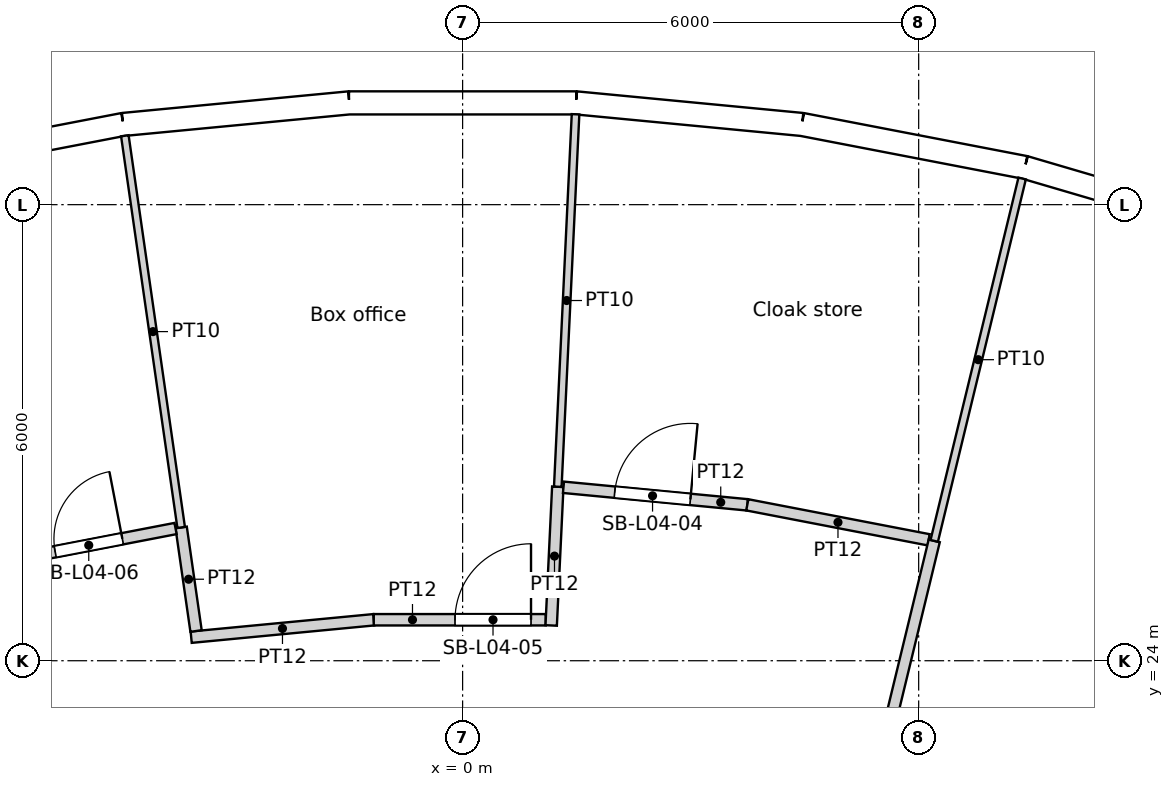
"""IFC4 building model, lengths in metres.
Left out: names, types, materials, properties, quantities, classifications, styles, units other than length and angle.
Written with IfcOpenShell. Run it as: python <this file> out.ifc"""

import sys

from ifc_helpers import new_model, si_unit, direction, frame, frame_2d, origin, origin_2d, place, context, subcontext, project, spatial, rectangle, circle, extrude, element, fill, save


model = new_model("IFC4")
c1 = context("Model", 3, precision=1e-05, world=origin(), true_north=direction((0.0, 1.0)))
c2 = subcontext(c1, "Body", "Model", "MODEL_VIEW")
j1 = project(units=[si_unit("LENGTHUNIT", "METRE"), si_unit("PLANEANGLEUNIT", "RADIAN")], contexts=[c1])
p1 = place(None, origin())
s1 = spatial("IfcSite", under=j1, at=p1, CompositionType="ELEMENT")
p2 = place(p1, origin())
s2 = spatial("IfcBuilding", under=s1, at=p2, CompositionType="ELEMENT")
p3 = place(p2, frame((0.0, 0.0, 23.4)))
s3 = spatial("IfcBuildingStorey", under=s2, at=p3, CompositionType="ELEMENT", Elevation=23.4)
for number, where, z_axis, x_axis in (
    (1, (7.137, 29.421, 0.0), (0.0, 0.0, 1.0), (1.0, 0.0, 0.0)),
    (2, (1.44, 30.24, 0.0), (0.0, 0.0, 1.0), (1.0, 0.0, 0.0)),
    (3, (-4.309, 29.966, 0.0), (0.0, 0.0, 1.0), (1.0, 0.0, 0.0)),
):
    element("IfcColumn", number, at=place(p3, frame(where, z_axis=z_axis, x_axis=x_axis)), inside=s3, PredefinedType="COLUMN", context=c2, shape_type="SweptSolid", body=[
        extrude(circle(Radius=0.7, at=origin_2d()), origin(), (0.0, 0.0, 1.0), 4.8),
    ])
for number, where, z_axis, x_axis in (
    (4, (4.263, 24.175, 0.0), (0.0, 0.0, 1.0), (1.0, 0.0, 0.0)),
    (5, (-1.427, 24.506, 0.0), (0.0, 0.0, 1.0), (1.0, 0.0, 0.0)),
):
    element("IfcColumn", number, at=place(p3, frame(where, z_axis=z_axis, x_axis=x_axis)), inside=s3, PredefinedType="COLUMN", context=c2, shape_type="SweptSolid", body=[
        extrude(circle(Radius=0.75, at=origin_2d()), origin(), (0.0, 0.0, 1.0), 4.8),
    ])
p4 = place(p3, frame((10.261, 29.649, 0.0), z_axis=(0.0, 0.0, 1.0), x_axis=(-0.959502108153, 0.281701445593, 0.0)))
e6 = element("IfcWall", 6, at=p4, inside=s3, PredefinedType="SOLIDWALL", context=c2, shape_type="SweptSolid", body=[
    extrude(rectangle(XDim=2.986, YDim=0.3, at=frame_2d((1.493, 0.0))), origin(), (0.0, 0.0, 1.0), 4.35),
])
p5 = place(p4, frame((1.493, 0.0, 2.0)))
e7 = element("IfcOpeningElement", 7, at=p5, cuts=e6, PredefinedType="OPENING", context=c2, shape_type="SweptSolid", body=[
    extrude(circle(Radius=1.2, at=origin_2d()), frame((0.0, 0.16, 0.0), z_axis=(0.0, -1.0, 0.0), x_axis=(1.0, 0.0, 0.0)), (0.0, 0.0, 1.0), 0.32),
])
p6 = place(p3, frame((7.397, 30.49, 0.0), z_axis=(0.0, 0.0, 1.0), x_axis=(-0.981918853666, 0.189302310646, 0.0)))
e8 = element("IfcWall", 8, at=p6, inside=s3, PredefinedType="SOLIDWALL", context=c2, shape_type="SweptSolid", body=[
    extrude(rectangle(XDim=2.986, YDim=0.3, at=frame_2d((1.493, 0.0))), origin(), (0.0, 0.0, 1.0), 4.35),
])
p7 = place(p6, frame((1.493, 0.0, 2.0)))
e9 = element("IfcOpeningElement", 9, at=p7, cuts=e8, PredefinedType="OPENING", context=c2, shape_type="SweptSolid", body=[
    extrude(circle(Radius=1.2, at=origin_2d()), frame((0.0, 0.16, 0.0), z_axis=(0.0, -1.0, 0.0), x_axis=(1.0, 0.0, 0.0)), (0.0, 0.0, 1.0), 0.32),
])
p8 = place(p3, frame((4.465, 31.055, 0.0), z_axis=(0.0, 0.0, 1.0), x_axis=(-0.99547560533, 0.095017467833, 0.0)))
e10 = element("IfcWall", 10, at=p8, inside=s3, PredefinedType="SOLIDWALL", context=c2, shape_type="SweptSolid", body=[
    extrude(rectangle(XDim=2.986, YDim=0.3, at=frame_2d((1.493, 0.0))), origin(), (0.0, 0.0, 1.0), 3.85),
])
p9 = place(p8, frame((1.493, 0.0, 2.0)))
e11 = element("IfcOpeningElement", 11, at=p9, cuts=e10, PredefinedType="OPENING", context=c2, shape_type="SweptSolid", body=[
    extrude(circle(Radius=1.2, at=origin_2d()), frame((0.0, 0.16, 0.0), z_axis=(0.0, -1.0, 0.0), x_axis=(1.0, 0.0, 0.0)), (0.0, 0.0, 1.0), 0.32),
])
p10 = place(p3, frame((1.493, 31.339, 0.0), z_axis=(0.0, 0.0, 1.0), x_axis=(-1.0, 0.0, 0.0)))
e12 = element("IfcWall", 12, at=p10, inside=s3, PredefinedType="SOLIDWALL", context=c2, shape_type="SweptSolid", body=[
    extrude(rectangle(XDim=2.986, YDim=0.3, at=frame_2d((1.493, 0.0))), origin(), (0.0, 0.0, 1.0), 4.35),
])
p11 = place(p10, frame((1.493, 0.0, 2.0)))
e13 = element("IfcOpeningElement", 13, at=p11, cuts=e12, PredefinedType="OPENING", context=c2, shape_type="SweptSolid", body=[
    extrude(circle(Radius=1.2, at=origin_2d()), frame((0.0, 0.16, 0.0), z_axis=(0.0, -1.0, 0.0), x_axis=(1.0, 0.0, 0.0)), (0.0, 0.0, 1.0), 0.32),
])
p12 = place(p3, frame((-1.493, 31.339, 0.0), z_axis=(0.0, 0.0, 1.0), x_axis=(-0.99547560533, -0.095017467833, 0.0)))
e14 = element("IfcWall", 14, at=p12, inside=s3, PredefinedType="SOLIDWALL", context=c2, shape_type="SweptSolid", body=[
    extrude(rectangle(XDim=2.986, YDim=0.3, at=frame_2d((1.493, 0.0))), origin(), (0.0, 0.0, 1.0), 4.35),
])
p13 = place(p12, frame((1.493, 0.0, 2.0)))
e15 = element("IfcOpeningElement", 15, at=p13, cuts=e14, PredefinedType="OPENING", context=c2, shape_type="SweptSolid", body=[
    extrude(circle(Radius=1.2, at=origin_2d()), frame((0.0, 0.16, 0.0), z_axis=(0.0, -1.0, 0.0), x_axis=(1.0, 0.0, 0.0)), (0.0, 0.0, 1.0), 0.32),
])
p14 = place(p3, frame((-4.465, 31.055, 0.0), z_axis=(0.0, 0.0, 1.0), x_axis=(-0.981918853666, -0.189302310646, 0.0)))
e16 = element("IfcWall", 16, at=p14, inside=s3, PredefinedType="SOLIDWALL", context=c2, shape_type="SweptSolid", body=[
    extrude(rectangle(XDim=2.986, YDim=0.3, at=frame_2d((1.493, 0.0))), origin(), (0.0, 0.0, 1.0), 3.85),
])
p15 = place(p14, frame((1.493, 0.0, 2.0)))
e17 = element("IfcOpeningElement", 17, at=p15, cuts=e16, PredefinedType="OPENING", context=c2, shape_type="SweptSolid", body=[
    extrude(circle(Radius=1.2, at=origin_2d()), frame((0.0, 0.16, 0.0), z_axis=(0.0, -1.0, 0.0), x_axis=(1.0, 0.0, 0.0)), (0.0, 0.0, 1.0), 0.32),
])
p16 = place(p3, frame((-4.444, 30.906, 0.0), z_axis=(0.0, 0.0, 1.0), x_axis=(0.142281368884, -0.989826253475, 0.0)))
e18 = element("IfcWall", 18, at=p16, inside=s3, PredefinedType="PARTITIONING", context=c2, shape_type="SweptSolid", body=[
    extrude(rectangle(XDim=5.206, YDim=0.1, at=frame_2d((2.603, 0.0))), origin(), (0.0, 0.0, 1.0), 3.75),
])
p17 = place(p3, frame((-6.134, 25.285, 0.0), z_axis=(0.0, 0.0, 1.0), x_axis=(0.981929480724, 0.189247179332, 0.0)))
e19 = element("IfcWall", 19, at=p17, inside=s3, PredefinedType="PARTITIONING", context=c2, shape_type="SweptSolid", body=[
    extrude(rectangle(XDim=2.401, YDim=0.15, at=frame_2d((1.2, 0.0))), origin(), (0.0, 0.0, 1.0), 3.75),
])
p18 = place(p17, frame((0.788, 0.0, 0.0)))
e20 = element("IfcOpeningElement", 20, at=p18, cuts=e19, PredefinedType="OPENING", context=c2, shape_type="SweptSolid", body=[
    extrude(rectangle(XDim=0.9, YDim=2.1, at=frame_2d((0.45, 1.05))), frame((0.0, 0.075, 0.0), z_axis=(0.0, -1.0, 0.0), x_axis=(1.0, 0.0, 0.0)), (0.0, 0.0, 1.0), 0.15),
])
p19 = place(p3, frame((-3.703, 25.753, 0.0), z_axis=(0.0, 0.0, 1.0), x_axis=(0.142414461885, -0.989807113051, 0.0)))
e21 = element("IfcWall", 21, at=p19, inside=s3, PredefinedType="PARTITIONING", context=c2, shape_type="SweptSolid", body=[
    extrude(rectangle(XDim=1.376, YDim=0.15, at=frame_2d((0.688, 0.0))), origin(), (0.0, 0.0, 1.0), 3.75),
])
p20 = place(p3, frame((-1.169, 24.539, 0.0), z_axis=(0.0, 0.0, 1.0), x_axis=(-0.995475896214, -0.095014420263, 0.0)))
e22 = element("IfcWall", 22, at=p20, inside=s3, PredefinedType="PARTITIONING", context=c2, shape_type="SweptSolid", body=[
    extrude(rectangle(XDim=2.413, YDim=0.15, at=frame_2d((1.207, 0.0))), origin(), (0.0, 0.0, 1.0), 3.75),
])
p21 = place(p3, frame((-1.169, 24.539, 0.0), z_axis=(0.0, 0.0, 1.0), x_axis=(1.0, 0.0, 0.0)))
e23 = element("IfcWall", 23, at=p21, inside=s3, PredefinedType="PARTITIONING", context=c2, shape_type="SweptSolid", body=[
    extrude(rectangle(XDim=2.263, YDim=0.15, at=frame_2d((1.131, 0.0))), origin(), (0.0, 0.0, 1.0), 3.75),
])
p22 = place(p21, frame((1.069, 0.0, 0.0)))
e24 = element("IfcOpeningElement", 24, at=p22, cuts=e23, PredefinedType="OPENING", context=c2, shape_type="SweptSolid", body=[
    extrude(rectangle(XDim=1.0, YDim=2.1, at=frame_2d((0.5, 1.05))), frame((0.0, 0.075, 0.0), z_axis=(0.0, -1.0, 0.0), x_axis=(1.0, 0.0, 0.0)), (0.0, 0.0, 1.0), 0.15),
])
p23 = place(p3, frame((1.252, 26.289, 0.0), z_axis=(0.0, 0.0, 1.0), x_axis=(-0.047577848771, -0.998867532912, 0.0)))
e25 = element("IfcWall", 25, at=p23, inside=s3, PredefinedType="PARTITIONING", context=c2, shape_type="SweptSolid", body=[
    extrude(rectangle(XDim=1.827, YDim=0.15, at=frame_2d((0.913, 0.0))), origin(), (0.0, 0.0, 1.0), 3.75),
])
p24 = place(p3, frame((1.486, 31.189, 0.0), z_axis=(0.0, 0.0, 1.0), x_axis=(-0.04757697182, -0.998867574683, 0.0)))
e26 = element("IfcWall", 26, at=p24, inside=s3, PredefinedType="PARTITIONING", context=c2, shape_type="SweptSolid", body=[
    extrude(rectangle(XDim=4.906, YDim=0.1, at=frame_2d((2.453, 0.0))), origin(), (0.0, 0.0, 1.0), 3.75),
])
p25 = place(p3, frame((1.327, 26.282, 0.0), z_axis=(0.0, 0.0, 1.0), x_axis=(0.995471958699, -0.095055664977, 0.0)))
e27 = element("IfcWall", 27, at=p25, inside=s3, PredefinedType="PARTITIONING", context=c2, shape_type="SweptSolid", body=[
    extrude(rectangle(XDim=2.43, YDim=0.15, at=frame_2d((1.215, 0.0))), origin(), (0.0, 0.0, 1.0), 3.75),
])
p26 = place(p25, frame((0.677, 0.0, 0.0)))
e28 = element("IfcOpeningElement", 28, at=p26, cuts=e27, PredefinedType="OPENING", context=c2, shape_type="SweptSolid", body=[
    extrude(rectangle(XDim=1.0, YDim=2.1, at=frame_2d((0.5, 1.05))), frame((0.0, 0.075, 0.0), z_axis=(0.0, -1.0, 0.0), x_axis=(1.0, 0.0, 0.0)), (0.0, 0.0, 1.0), 0.15),
])
p27 = place(p3, frame((6.205, 25.577, 0.0), z_axis=(0.0, 0.0, 1.0), x_axis=(-0.235759138487, -0.971811519082, 0.0)))
e29 = element("IfcWall", 29, at=p27, inside=s3, PredefinedType="PARTITIONING", context=c2, shape_type="SweptSolid", body=[
    extrude(rectangle(XDim=13.482, YDim=0.15, at=frame_2d((6.741, 0.0))), origin(), (0.0, 0.0, 1.0), 3.75),
])
p28 = place(p3, frame((6.131, 25.591, 0.0), z_axis=(0.0, 0.0, 1.0), x_axis=(-0.981932542108, 0.189231294319, 0.0)))
e30 = element("IfcWall", 30, at=p28, inside=s3, PredefinedType="PARTITIONING", context=c2, shape_type="SweptSolid", body=[
    extrude(rectangle(XDim=2.429, YDim=0.15, at=frame_2d((1.215, 0.0))), origin(), (0.0, 0.0, 1.0), 3.75),
])
p29 = place(p3, frame((7.361, 30.344, 0.0), z_axis=(0.0, 0.0, 1.0), x_axis=(-0.235760987456, -0.971811070524, 0.0)))
e31 = element("IfcWall", 31, at=p29, inside=s3, PredefinedType="PARTITIONING", context=c2, shape_type="SweptSolid", body=[
    extrude(rectangle(XDim=4.905, YDim=0.1, at=frame_2d((2.453, 0.0))), origin(), (0.0, 0.0, 1.0), 3.75),
])
p30 = place(p5, origin())
e32 = element("IfcWindow", 32, at=p30, inside=s3, PartitioningType="SINGLE_PANEL", PredefinedType="WINDOW", context=c2, shape_type="SweptSolid", body=[
    extrude(circle(Radius=1.2, at=origin_2d()), frame((0.0, 0.12, 0.0), z_axis=(0.0, -1.0, 0.0), x_axis=(1.0, 0.0, 0.0)), (0.0, 0.0, 1.0), 0.1),
])
fill(e7, e32)
p31 = place(p7, origin())
e33 = element("IfcWindow", 33, at=p31, inside=s3, PartitioningType="SINGLE_PANEL", PredefinedType="WINDOW", context=c2, shape_type="SweptSolid", body=[
    extrude(circle(Radius=1.2, at=origin_2d()), frame((0.0, 0.12, 0.0), z_axis=(0.0, -1.0, 0.0), x_axis=(1.0, 0.0, 0.0)), (0.0, 0.0, 1.0), 0.1),
])
fill(e9, e33)
p32 = place(p9, origin())
e34 = element("IfcWindow", 34, at=p32, inside=s3, PartitioningType="SINGLE_PANEL", PredefinedType="WINDOW", context=c2, shape_type="SweptSolid", body=[
    extrude(circle(Radius=1.2, at=origin_2d()), frame((0.0, 0.12, 0.0), z_axis=(0.0, -1.0, 0.0), x_axis=(1.0, 0.0, 0.0)), (0.0, 0.0, 1.0), 0.1),
])
fill(e11, e34)
p33 = place(p11, origin())
e35 = element("IfcWindow", 35, at=p33, inside=s3, PartitioningType="SINGLE_PANEL", PredefinedType="WINDOW", context=c2, shape_type="SweptSolid", body=[
    extrude(circle(Radius=1.2, at=origin_2d()), frame((0.0, 0.12, 0.0), z_axis=(0.0, -1.0, 0.0), x_axis=(1.0, 0.0, 0.0)), (0.0, 0.0, 1.0), 0.1),
])
fill(e13, e35)
p34 = place(p13, origin())
e36 = element("IfcWindow", 36, at=p34, inside=s3, PartitioningType="SINGLE_PANEL", PredefinedType="WINDOW", context=c2, shape_type="SweptSolid", body=[
    extrude(circle(Radius=1.2, at=origin_2d()), frame((0.0, 0.12, 0.0), z_axis=(0.0, -1.0, 0.0), x_axis=(1.0, 0.0, 0.0)), (0.0, 0.0, 1.0), 0.1),
])
fill(e15, e36)
p35 = place(p15, origin())
e37 = element("IfcWindow", 37, at=p35, inside=s3, PartitioningType="SINGLE_PANEL", PredefinedType="WINDOW", context=c2, shape_type="SweptSolid", body=[
    extrude(circle(Radius=1.2, at=origin_2d()), frame((0.0, 0.12, 0.0), z_axis=(0.0, -1.0, 0.0), x_axis=(1.0, 0.0, 0.0)), (0.0, 0.0, 1.0), 0.1),
])
fill(e17, e37)
p36 = place(p26, origin())
e38 = element("IfcDoor", 38, at=p36, inside=s3, OperationType="SINGLE_SWING_RIGHT", PredefinedType="DOOR", context=c2, shape_type="SweptSolid", body=[
    extrude(rectangle(XDim=1.0, YDim=2.1, at=frame_2d((0.5, 1.05))), frame((0.0, 0.025, 0.0), z_axis=(0.0, -1.0, 0.0), x_axis=(1.0, 0.0, 0.0)), (0.0, 0.0, 1.0), 0.05),
])
fill(e28, e38)
p37 = place(p22, origin())
e39 = element("IfcDoor", 39, at=p37, inside=s3, OperationType="SINGLE_SWING_RIGHT", PredefinedType="DOOR", context=c2, shape_type="SweptSolid", body=[
    extrude(rectangle(XDim=1.0, YDim=2.1, at=frame_2d((0.5, 1.05))), frame((0.0, 0.025, 0.0), z_axis=(0.0, -1.0, 0.0), x_axis=(1.0, 0.0, 0.0)), (0.0, 0.0, 1.0), 0.05),
])
fill(e24, e39)
p38 = place(p18, origin())
e40 = element("IfcDoor", 40, at=p38, inside=s3, OperationType="SINGLE_SWING_RIGHT", PredefinedType="DOOR", context=c2, shape_type="SweptSolid", body=[
    extrude(rectangle(XDim=0.9, YDim=2.1, at=frame_2d((0.45, 1.05))), frame((0.0, 0.025, 0.0), z_axis=(0.0, -1.0, 0.0), x_axis=(1.0, 0.0, 0.0)), (0.0, 0.0, 1.0), 0.05),
])
fill(e20, e40)
save(model, sys.argv[1])
